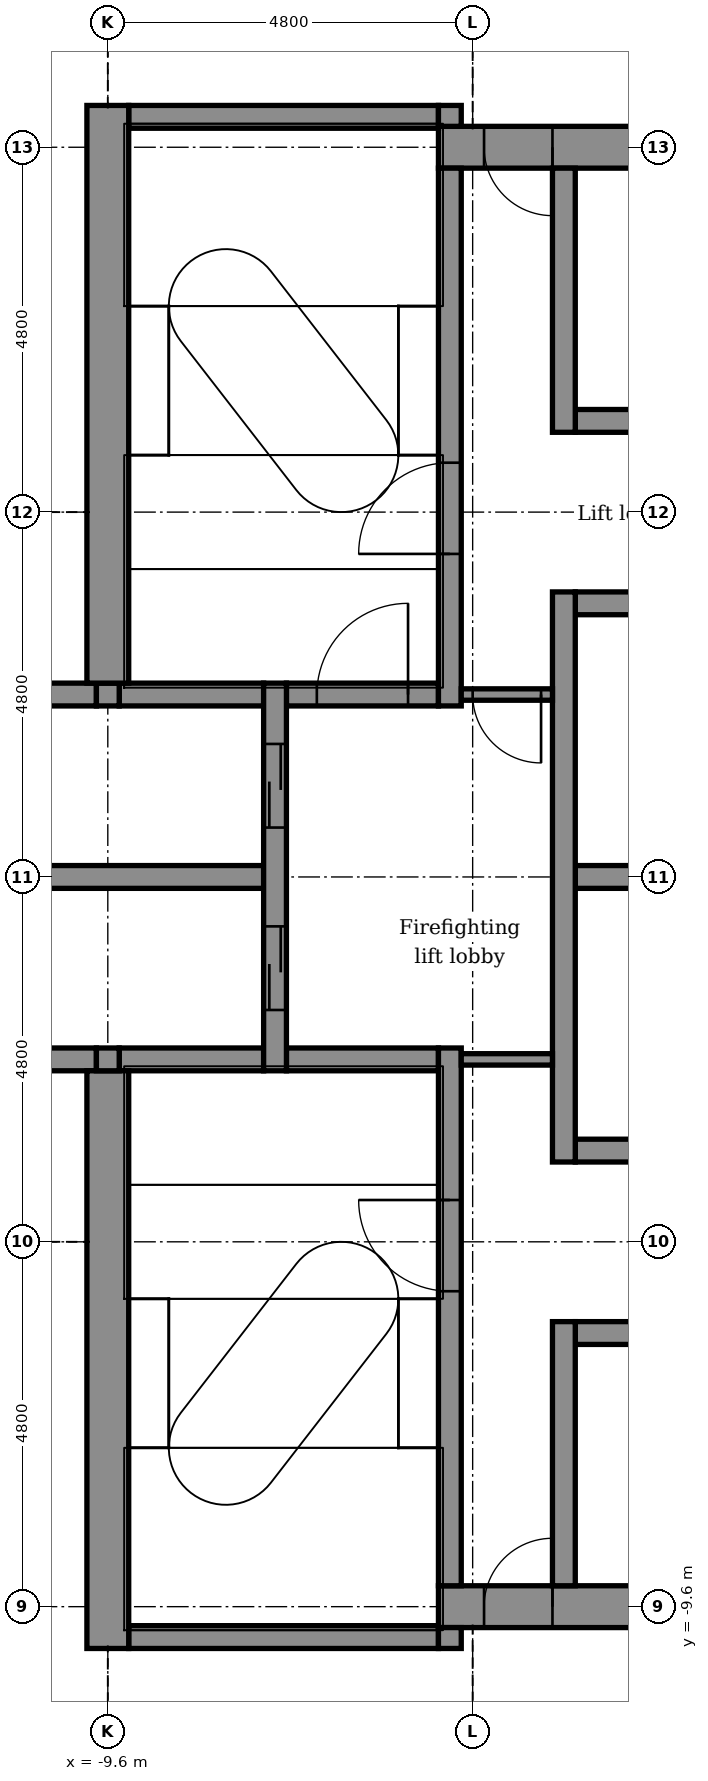
"""IFC4 building model, lengths in metres.
Left out: names, types, materials, properties, quantities, classifications, styles, units other than length and angle.
Written with IfcOpenShell. Run it as: python <this file> out.ifc"""

import sys

from ifc_helpers import new_model, si_unit, direction, frame, frame_2d, origin, place, context, subcontext, project, spatial, rectangle, extrude, element, fill, save


model = new_model("IFC4")
c1 = context("Model", 3, precision=1e-05, world=origin(), true_north=direction((0.0, 1.0)))
c2 = subcontext(c1, "Body", "Model", "MODEL_VIEW")
j1 = project(units=[si_unit("LENGTHUNIT", "METRE"), si_unit("PLANEANGLEUNIT", "RADIAN")], contexts=[c1])
p1 = place(None, origin())
s1 = spatial("IfcSite", under=j1, at=p1, CompositionType="ELEMENT")
p2 = place(p1, origin())
s2 = spatial("IfcBuilding", under=s1, at=p2, CompositionType="ELEMENT")
p3 = place(p2, frame((0.0, 0.0, 296.9)))
s3 = spatial("IfcBuildingStorey", under=s2, at=p3, CompositionType="ELEMENT", Elevation=296.9)
p4 = place(p3, frame((-9.325, -10.0, -0.3), z_axis=(0.0, 0.0, 1.0), x_axis=(1.0, 0.0, 0.0)))
e1 = element("IfcWall", 1, at=p4, inside=s3, PredefinedType="STANDARD", context=c2, shape_type="SweptSolid", body=[
    extrude(rectangle(XDim=4.075, YDim=0.3, at=frame_2d((2.038, 0.0))), origin(), (0.0, 0.0, 1.0), 5.0),
])
p5 = place(p3, frame((-5.25, -9.6, -0.3), z_axis=(0.0, 0.0, 1.0), x_axis=(1.0, 0.0, 0.0)))
e2 = element("IfcWall", 2, at=p5, inside=s3, PredefinedType="SHEAR", context=c2, shape_type="SweptSolid", body=[
    extrude(rectangle(XDim=10.2, YDim=0.55, at=frame_2d((5.1, 0.0))), origin(), (0.0, 0.0, 1.0), 5.0),
])
p6 = place(p5, frame((0.6, 0.0, 0.3)))
e3 = element("IfcOpeningElement", 3, at=p6, cuts=e2, PredefinedType="OPENING", context=c2, shape_type="SweptSolid", body=[
    extrude(rectangle(XDim=0.9, YDim=2.1, at=frame_2d((0.45, 1.05))), frame((0.0, 0.285, 0.0), z_axis=(0.0, -1.0, 0.0), x_axis=(1.0, 0.0, 0.0)), (0.0, 0.0, 1.0), 0.57),
])
for number, where, z_axis, x_axis in (
    (4, (-3.45, -6.0, -0.3), (0.0, 0.0, 1.0), (1.0, 0.0, 0.0)),
    (5, (-3.45, -3.6, -0.3), (0.0, 0.0, 1.0), (1.0, 0.0, 0.0)),
):
    element("IfcWall", number, at=place(p3, frame(where, z_axis=z_axis, x_axis=x_axis)), inside=s3, PredefinedType="STANDARD", context=c2, shape_type="SweptSolid", body=[
        extrude(rectangle(XDim=2.1, YDim=0.3, at=frame_2d((1.05, 0.0))), origin(), (0.0, 0.0, 1.0), 0.8),
    ])
p7 = place(p3, frame((-10.85, -2.4, -0.3), z_axis=(0.0, 0.0, 1.0), x_axis=(1.0, 0.0, 0.0)))
e6 = element("IfcWall", 6, at=p7, inside=s3, PredefinedType="STANDARD", context=c2, shape_type="SweptSolid", body=[
    extrude(rectangle(XDim=1.1, YDim=0.3, at=frame_2d((0.55, 0.0))), origin(), (0.0, 0.0, 1.0), 5.0),
])
p8 = place(p3, frame((-9.45, -2.4, -0.3), z_axis=(0.0, 0.0, 1.0), x_axis=(1.0, 0.0, 0.0)))
e7 = element("IfcWall", 7, at=p8, inside=s3, PredefinedType="STANDARD", context=c2, shape_type="SweptSolid", body=[
    extrude(rectangle(XDim=1.9, YDim=0.3, at=frame_2d((0.95, 0.0))), origin(), (0.0, 0.0, 1.0), 5.0),
])
p9 = place(p3, frame((-7.25, -2.4, -0.3), z_axis=(0.0, 0.0, 1.0), x_axis=(1.0, 0.0, 0.0)))
e8 = element("IfcWall", 8, at=p9, inside=s3, PredefinedType="STANDARD", context=c2, shape_type="SweptSolid", body=[
    extrude(rectangle(XDim=2.0, YDim=0.3, at=frame_2d((1.0, 0.0))), origin(), (0.0, 0.0, 1.0), 5.0),
])
p10 = place(p3, frame((-10.85, 0.0, -0.3), z_axis=(0.0, 0.0, 1.0), x_axis=(1.0, 0.0, 0.0)))
e9 = element("IfcWall", 9, at=p10, inside=s3, PredefinedType="STANDARD", context=c2, shape_type="SweptSolid", body=[
    extrude(rectangle(XDim=3.3, YDim=0.3, at=frame_2d((1.65, 0.0))), origin(), (0.0, 0.0, 1.0), 5.0),
])
p11 = place(p3, frame((-3.45, 0.0, -0.3), z_axis=(0.0, 0.0, 1.0), x_axis=(1.0, 0.0, 0.0)))
e10 = element("IfcWall", 10, at=p11, inside=s3, PredefinedType="STANDARD", context=c2, shape_type="SweptSolid", body=[
    extrude(rectangle(XDim=2.1, YDim=0.3, at=frame_2d((1.05, 0.0))), origin(), (0.0, 0.0, 1.0), 0.8),
])
p12 = place(p3, frame((-10.85, 2.4, -0.3), z_axis=(0.0, 0.0, 1.0), x_axis=(1.0, 0.0, 0.0)))
e11 = element("IfcWall", 11, at=p12, inside=s3, PredefinedType="STANDARD", context=c2, shape_type="SweptSolid", body=[
    extrude(rectangle(XDim=1.1, YDim=0.3, at=frame_2d((0.55, 0.0))), origin(), (0.0, 0.0, 1.0), 5.0),
])
p13 = place(p3, frame((-9.45, 2.4, -0.3), z_axis=(0.0, 0.0, 1.0), x_axis=(1.0, 0.0, 0.0)))
e12 = element("IfcWall", 12, at=p13, inside=s3, PredefinedType="STANDARD", context=c2, shape_type="SweptSolid", body=[
    extrude(rectangle(XDim=1.9, YDim=0.3, at=frame_2d((0.95, 0.0))), origin(), (0.0, 0.0, 1.0), 5.0),
])
p14 = place(p3, frame((-7.25, 2.4, -0.3), z_axis=(0.0, 0.0, 1.0), x_axis=(1.0, 0.0, 0.0)))
e13 = element("IfcWall", 13, at=p14, inside=s3, PredefinedType="STANDARD", context=c2, shape_type="SweptSolid", body=[
    extrude(rectangle(XDim=2.0, YDim=0.3, at=frame_2d((1.0, 0.0))), origin(), (0.0, 0.0, 1.0), 5.0),
])
p15 = place(p14, frame((0.4, 0.0, 0.3)))
e14 = element("IfcOpeningElement", 14, at=p15, cuts=e13, PredefinedType="OPENING", context=c2, shape_type="SweptSolid", body=[
    extrude(rectangle(XDim=1.2, YDim=2.1, at=frame_2d((0.6, 1.05))), frame((0.0, 0.16, 0.0), z_axis=(0.0, -1.0, 0.0), x_axis=(1.0, 0.0, 0.0)), (0.0, 0.0, 1.0), 0.32),
])
for number, where, z_axis, x_axis in (
    (15, (-3.45, 3.6, -0.3), (0.0, 0.0, 1.0), (1.0, 0.0, 0.0)),
    (16, (-3.45, 6.0, -0.3), (0.0, 0.0, 1.0), (1.0, 0.0, 0.0)),
):
    element("IfcWall", number, at=place(p3, frame(where, z_axis=z_axis, x_axis=x_axis)), inside=s3, PredefinedType="STANDARD", context=c2, shape_type="SweptSolid", body=[
        extrude(rectangle(XDim=2.1, YDim=0.3, at=frame_2d((1.05, 0.0))), origin(), (0.0, 0.0, 1.0), 0.8),
    ])
p16 = place(p3, frame((-5.25, 9.6, -0.3), z_axis=(0.0, 0.0, 1.0), x_axis=(1.0, 0.0, 0.0)))
e17 = element("IfcWall", 17, at=p16, inside=s3, PredefinedType="SHEAR", context=c2, shape_type="SweptSolid", body=[
    extrude(rectangle(XDim=14.575, YDim=0.55, at=frame_2d((7.288, 0.0))), origin(), (0.0, 0.0, 1.0), 5.0),
])
p17 = place(p16, frame((0.6, 0.0, 0.3)))
e18 = element("IfcOpeningElement", 18, at=p17, cuts=e17, PredefinedType="OPENING", context=c2, shape_type="SweptSolid", body=[
    extrude(rectangle(XDim=0.9, YDim=2.1, at=frame_2d((0.45, 1.05))), frame((0.0, 0.285, 0.0), z_axis=(0.0, -1.0, 0.0), x_axis=(1.0, 0.0, 0.0)), (0.0, 0.0, 1.0), 0.57),
])
p18 = place(p3, frame((-9.325, 10.0, -0.3), z_axis=(0.0, 0.0, 1.0), x_axis=(1.0, 0.0, 0.0)))
e19 = element("IfcWall", 19, at=p18, inside=s3, PredefinedType="STANDARD", context=c2, shape_type="SweptSolid", body=[
    extrude(rectangle(XDim=4.075, YDim=0.3, at=frame_2d((2.038, 0.0))), origin(), (0.0, 0.0, 1.0), 5.0),
])
p19 = place(p3, frame((-9.6, -10.15, -0.3), z_axis=(0.0, 0.0, 1.0), x_axis=(0.0, 1.0, 0.0)))
e20 = element("IfcWall", 20, at=p19, inside=s3, PredefinedType="SHEAR", context=c2, shape_type="SweptSolid", body=[
    extrude(rectangle(XDim=7.6, YDim=0.55, at=frame_2d((3.8, 0.0))), origin(), (0.0, 0.0, 1.0), 5.0),
])
for number, where, z_axis, x_axis in (
    (21, (-9.6, -2.55, -0.3), (0.0, 0.0, 1.0), (0.0, 1.0, 0.0)),
    (22, (-9.6, 2.25, -0.3), (0.0, 0.0, 1.0), (0.0, 1.0, 0.0)),
):
    element("IfcWall", number, at=place(p3, frame(where, z_axis=z_axis, x_axis=x_axis)), inside=s3, PredefinedType="STANDARD", context=c2, shape_type="SweptSolid", body=[
        extrude(rectangle(XDim=0.3, YDim=0.3, at=frame_2d((0.15, 0.0))), origin(), (0.0, 0.0, 1.0), 5.0),
    ])
p20 = place(p3, frame((-9.6, 2.55, -0.3), z_axis=(0.0, 0.0, 1.0), x_axis=(0.0, 1.0, 0.0)))
e23 = element("IfcWall", 23, at=p20, inside=s3, PredefinedType="SHEAR", context=c2, shape_type="SweptSolid", body=[
    extrude(rectangle(XDim=7.6, YDim=0.55, at=frame_2d((3.8, 0.0))), origin(), (0.0, 0.0, 1.0), 5.0),
])
p21 = place(p3, frame((-7.4, -2.55, -0.3), z_axis=(0.0, 0.0, 1.0), x_axis=(0.0, 1.0, 0.0)))
e24 = element("IfcWall", 24, at=p21, inside=s3, PredefinedType="STANDARD", context=c2, shape_type="SweptSolid", body=[
    extrude(rectangle(XDim=5.1, YDim=0.3, at=frame_2d((2.55, 0.0))), origin(), (0.0, 0.0, 1.0), 5.0),
])
p22 = place(p21, frame((0.8, 0.0, 0.3)))
e25 = element("IfcOpeningElement", 25, at=p22, cuts=e24, PredefinedType="OPENING", context=c2, shape_type="SweptSolid", body=[
    extrude(rectangle(XDim=1.1, YDim=2.1, at=frame_2d((0.55, 1.05))), frame((0.0, 0.16, 0.0), z_axis=(0.0, -1.0, 0.0), x_axis=(1.0, 0.0, 0.0)), (0.0, 0.0, 1.0), 0.32),
])
p23 = place(p21, frame((3.2, 0.0, 0.3)))
e26 = element("IfcOpeningElement", 26, at=p23, cuts=e24, PredefinedType="OPENING", context=c2, shape_type="SweptSolid", body=[
    extrude(rectangle(XDim=1.1, YDim=2.1, at=frame_2d((0.55, 1.05))), frame((0.0, 0.16, 0.0), z_axis=(0.0, -1.0, 0.0), x_axis=(1.0, 0.0, 0.0)), (0.0, 0.0, 1.0), 0.32),
])
p24 = place(p3, frame((-5.1, -10.15, -0.3), z_axis=(0.0, 0.0, 1.0), x_axis=(0.0, 1.0, 0.0)))
e27 = element("IfcWall", 27, at=p24, inside=s3, PredefinedType="STANDARD", context=c2, shape_type="SweptSolid", body=[
    extrude(rectangle(XDim=0.275, YDim=0.3, at=frame_2d((0.137, 0.0))), origin(), (0.0, 0.0, 1.0), 5.0),
])
p25 = place(p3, frame((-5.1, -9.325, -0.3), z_axis=(0.0, 0.0, 1.0), x_axis=(0.0, 1.0, 0.0)))
e28 = element("IfcWall", 28, at=p25, inside=s3, PredefinedType="STANDARD", context=c2, shape_type="SweptSolid", body=[
    extrude(rectangle(XDim=7.075, YDim=0.3, at=frame_2d((3.538, 0.0))), origin(), (0.0, 0.0, 1.0), 5.0),
])
p26 = place(p25, frame((3.875, 0.0, 0.3)))
e29 = element("IfcOpeningElement", 29, at=p26, cuts=e28, PredefinedType="OPENING", context=c2, shape_type="SweptSolid", body=[
    extrude(rectangle(XDim=1.2, YDim=2.1, at=frame_2d((0.6, 1.05))), frame((0.0, 0.16, 0.0), z_axis=(0.0, -1.0, 0.0), x_axis=(1.0, 0.0, 0.0)), (0.0, 0.0, 1.0), 0.32),
])
p27 = place(p3, frame((-5.1, 2.25, -0.3), z_axis=(0.0, 0.0, 1.0), x_axis=(0.0, 1.0, 0.0)))
e30 = element("IfcWall", 30, at=p27, inside=s3, PredefinedType="STANDARD", context=c2, shape_type="SweptSolid", body=[
    extrude(rectangle(XDim=7.075, YDim=0.3, at=frame_2d((3.538, 0.0))), origin(), (0.0, 0.0, 1.0), 5.0),
])
p28 = place(p27, frame((2.0, 0.0, 0.3)))
e31 = element("IfcOpeningElement", 31, at=p28, cuts=e30, PredefinedType="OPENING", context=c2, shape_type="SweptSolid", body=[
    extrude(rectangle(XDim=1.2, YDim=2.1, at=frame_2d((0.6, 1.05))), frame((0.0, 0.16, 0.0), z_axis=(0.0, -1.0, 0.0), x_axis=(1.0, 0.0, 0.0)), (0.0, 0.0, 1.0), 0.32),
])
p29 = place(p3, frame((-5.1, 9.875, -0.3), z_axis=(0.0, 0.0, 1.0), x_axis=(0.0, 1.0, 0.0)))
e32 = element("IfcWall", 32, at=p29, inside=s3, PredefinedType="STANDARD", context=c2, shape_type="SweptSolid", body=[
    extrude(rectangle(XDim=0.275, YDim=0.3, at=frame_2d((0.137, 0.0))), origin(), (0.0, 0.0, 1.0), 5.0),
])
p30 = place(p3, frame((-3.6, -9.325, -0.3), z_axis=(0.0, 0.0, 1.0), x_axis=(0.0, 1.0, 0.0)))
e33 = element("IfcWall", 33, at=p30, inside=s3, PredefinedType="STANDARD", context=c2, shape_type="SweptSolid", body=[
    extrude(rectangle(XDim=3.475, YDim=0.3, at=frame_2d((1.737, 0.0))), origin(), (0.0, 0.0, 1.0), 0.8),
])
p31 = place(p3, frame((-3.6, -3.75, -0.3), z_axis=(0.0, 0.0, 1.0), x_axis=(0.0, 1.0, 0.0)))
e34 = element("IfcWall", 34, at=p31, inside=s3, PredefinedType="STANDARD", context=c2, shape_type="SweptSolid", body=[
    extrude(rectangle(XDim=7.5, YDim=0.3, at=frame_2d((3.75, 0.0))), origin(), (0.0, 0.0, 1.0), 0.8),
])
p32 = place(p3, frame((-3.6, 5.85, -0.3), z_axis=(0.0, 0.0, 1.0), x_axis=(0.0, 1.0, 0.0)))
e35 = element("IfcWall", 35, at=p32, inside=s3, PredefinedType="STANDARD", context=c2, shape_type="SweptSolid", body=[
    extrude(rectangle(XDim=3.475, YDim=0.3, at=frame_2d((1.737, 0.0))), origin(), (0.0, 0.0, 1.0), 0.8),
])
p33 = place(p3, frame((-4.95, 2.4, 0.0), z_axis=(0.0, 0.0, 1.0), x_axis=(1.0, 0.0, 0.0)))
e36 = element("IfcWall", 36, at=p33, inside=s3, PredefinedType="PARTITIONING", context=c2, shape_type="SweptSolid", body=[
    extrude(rectangle(XDim=1.2, YDim=0.15, at=frame_2d((0.6, 0.0))), origin(), (0.0, 0.0, 1.0), 4.7),
])
p34 = place(p33, frame((0.15, 0.0, 0.0)))
e37 = element("IfcOpeningElement", 37, at=p34, cuts=e36, PredefinedType="OPENING", context=c2, shape_type="SweptSolid", body=[
    extrude(rectangle(XDim=0.9, YDim=2.1, at=frame_2d((0.45, 1.05))), frame((0.0, 0.085, 0.0), z_axis=(0.0, -1.0, 0.0), x_axis=(1.0, 0.0, 0.0)), (0.0, 0.0, 1.0), 0.17),
])
p35 = place(p3, frame((-4.95, -2.4, 0.0), z_axis=(0.0, 0.0, 1.0), x_axis=(1.0, 0.0, 0.0)))
e38 = element("IfcWall", 38, at=p35, inside=s3, PredefinedType="PARTITIONING", context=c2, shape_type="SweptSolid", body=[
    extrude(rectangle(XDim=1.2, YDim=0.15, at=frame_2d((0.6, 0.0))), origin(), (0.0, 0.0, 1.0), 4.7),
])
p36 = place(p22, origin())
e39 = element("IfcDoor", 39, at=p36, inside=s3, OperationType="DOUBLE_DOOR_SLIDING", PredefinedType="DOOR", context=c2, shape_type="SweptSolid", body=[
    extrude(rectangle(XDim=1.1, YDim=2.1, at=frame_2d((0.55, 1.05))), frame((0.0, 0.025, 0.0), z_axis=(0.0, -1.0, 0.0), x_axis=(1.0, 0.0, 0.0)), (0.0, 0.0, 1.0), 0.05),
])
fill(e25, e39)
p37 = place(p23, origin())
e40 = element("IfcDoor", 40, at=p37, inside=s3, OperationType="DOUBLE_DOOR_SLIDING", PredefinedType="DOOR", context=c2, shape_type="SweptSolid", body=[
    extrude(rectangle(XDim=1.1, YDim=2.1, at=frame_2d((0.55, 1.05))), frame((0.0, 0.025, 0.0), z_axis=(0.0, -1.0, 0.0), x_axis=(1.0, 0.0, 0.0)), (0.0, 0.0, 1.0), 0.05),
])
fill(e26, e40)
p38 = place(p28, origin())
e41 = element("IfcDoor", 41, at=p38, inside=s3, OperationType="SINGLE_SWING_LEFT", PredefinedType="DOOR", context=c2, shape_type="SweptSolid", body=[
    extrude(rectangle(XDim=1.2, YDim=2.1, at=frame_2d((0.6, 1.05))), frame((0.0, 0.025, 0.0), z_axis=(0.0, -1.0, 0.0), x_axis=(1.0, 0.0, 0.0)), (0.0, 0.0, 1.0), 0.05),
])
fill(e31, e41)
p39 = place(p26, origin())
e42 = element("IfcDoor", 42, at=p39, inside=s3, OperationType="SINGLE_SWING_RIGHT", PredefinedType="DOOR", context=c2, shape_type="SweptSolid", body=[
    extrude(rectangle(XDim=1.2, YDim=2.1, at=frame_2d((0.6, 1.05))), frame((0.0, 0.025, 0.0), z_axis=(0.0, -1.0, 0.0), x_axis=(1.0, 0.0, 0.0)), (0.0, 0.0, 1.0), 0.05),
])
fill(e29, e42)
p40 = place(p17, frame((0.9, 0.0, 0.0), z_axis=(0.0, 0.0, 1.0), x_axis=(-1.0, 0.0, 0.0)))
e43 = element("IfcDoor", 43, at=p40, inside=s3, OperationType="SINGLE_SWING_RIGHT", PredefinedType="DOOR", context=c2, shape_type="SweptSolid", body=[
    extrude(rectangle(XDim=0.9, YDim=2.1, at=frame_2d((0.45, 1.05))), frame((0.0, 0.025, 0.0), z_axis=(0.0, -1.0, 0.0), x_axis=(1.0, 0.0, 0.0)), (0.0, 0.0, 1.0), 0.05),
])
fill(e18, e43)
p41 = place(p6, origin())
e44 = element("IfcDoor", 44, at=p41, inside=s3, OperationType="SINGLE_SWING_RIGHT", PredefinedType="DOOR", context=c2, shape_type="SweptSolid", body=[
    extrude(rectangle(XDim=0.9, YDim=2.1, at=frame_2d((0.45, 1.05))), frame((0.0, 0.025, 0.0), z_axis=(0.0, -1.0, 0.0), x_axis=(1.0, 0.0, 0.0)), (0.0, 0.0, 1.0), 0.05),
])
fill(e3, e44)
p42 = place(p34, frame((0.9, 0.0, 0.0), z_axis=(0.0, 0.0, 1.0), x_axis=(-1.0, 0.0, 0.0)))
e45 = element("IfcDoor", 45, at=p42, inside=s3, OperationType="SINGLE_SWING_RIGHT", PredefinedType="DOOR", context=c2, shape_type="SweptSolid", body=[
    extrude(rectangle(XDim=0.9, YDim=2.1, at=frame_2d((0.45, 1.05))), frame((0.0, 0.025, 0.0), z_axis=(0.0, -1.0, 0.0), x_axis=(1.0, 0.0, 0.0)), (0.0, 0.0, 1.0), 0.05),
])
fill(e37, e45)
p43 = place(p15, origin())
e46 = element("IfcDoor", 46, at=p43, inside=s3, OperationType="SINGLE_SWING_RIGHT", PredefinedType="DOOR", context=c2, shape_type="SweptSolid", body=[
    extrude(rectangle(XDim=1.2, YDim=2.1, at=frame_2d((0.6, 1.05))), frame((0.0, 0.025, 0.0), z_axis=(0.0, -1.0, 0.0), x_axis=(1.0, 0.0, 0.0)), (0.0, 0.0, 1.0), 0.05),
])
fill(e14, e46)
save(model, sys.argv[1])
